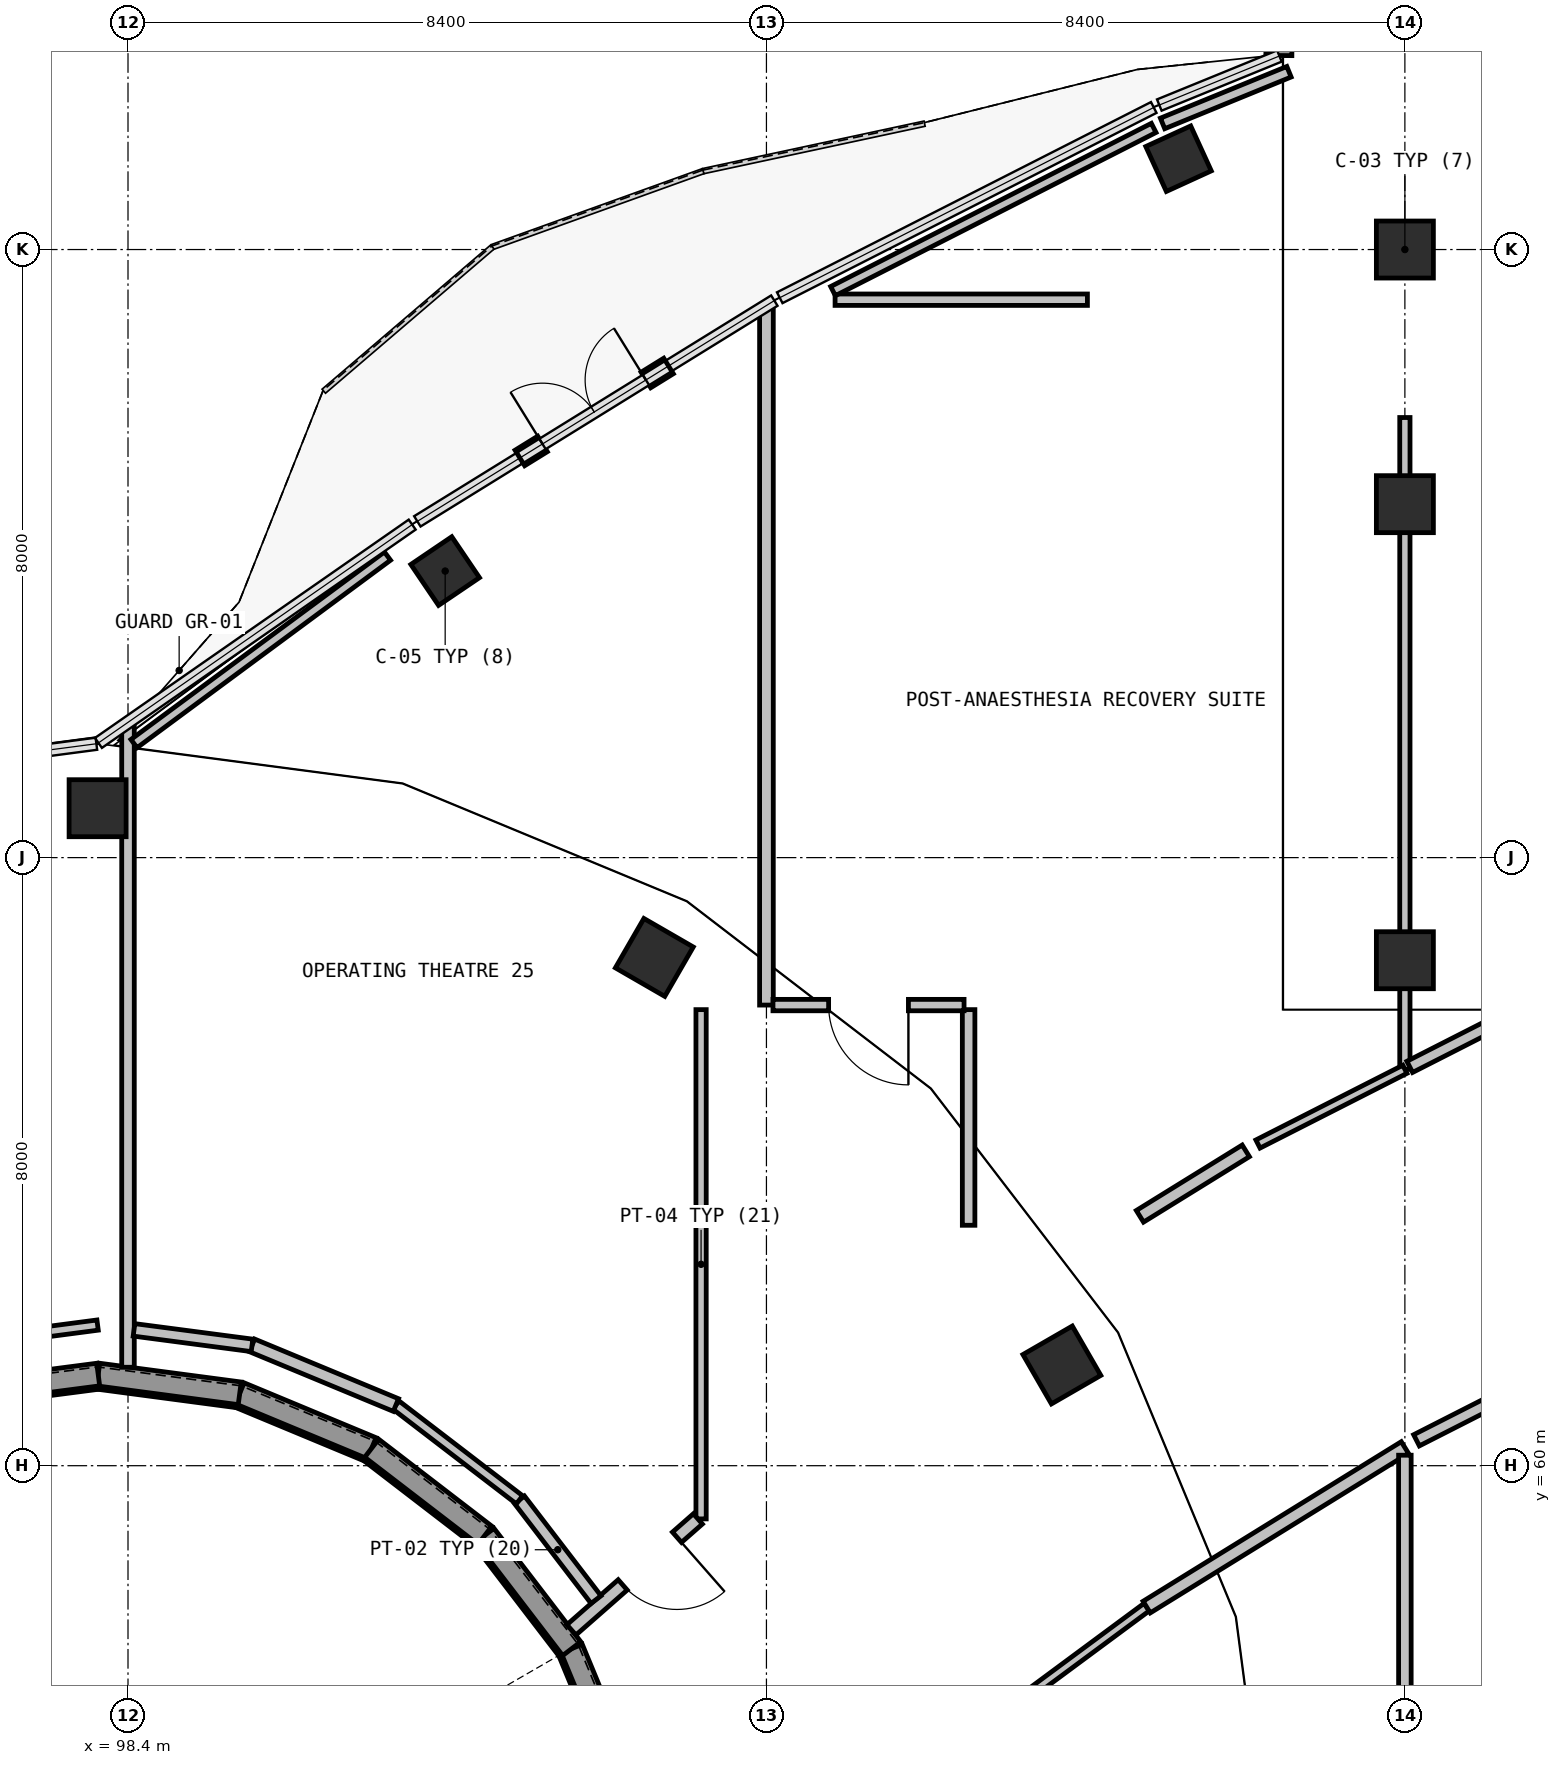
"""IFC4 building model, lengths in metres.
Left out: names, types, materials, properties, quantities, classifications, styles, units other than length and angle.
Written with IfcOpenShell. Run it as: python <this file> out.ifc"""

import sys

from ifc_helpers import new_model, si_unit, direction, frame, frame_2d, origin, origin_2d, place, context, subcontext, project, spatial, rectangle, circle, extrude, element, fill, save


model = new_model("IFC4")
c1 = context("Model", 3, precision=1e-05, world=origin(), true_north=direction((0.0, 1.0)))
c2 = subcontext(c1, "Body", "Model", "MODEL_VIEW")
j1 = project(units=[si_unit("LENGTHUNIT", "METRE"), si_unit("PLANEANGLEUNIT", "RADIAN")], contexts=[c1])
p1 = place(None, origin())
s1 = spatial("IfcSite", under=j1, at=p1, CompositionType="ELEMENT")
p2 = place(p1, origin())
s2 = spatial("IfcBuilding", under=s1, at=p2, CompositionType="ELEMENT")
p3 = place(p2, frame((0.0, 0.0, 10.2)))
s3 = spatial("IfcBuildingStorey", under=s2, at=p3, CompositionType="ELEMENT", Elevation=10.2)
for number, where, z_axis, x_axis in (
    (1, (110.687, 61.325, 0.0), (0.0, 0.0, 1.0), (0.866, 0.5, 0.0)),
    (2, (105.325, 66.687, 0.0), (0.0, 0.0, 1.0), (0.5, 0.866, 0.0)),
    (3, (98.0, 68.65, 0.0), (0.0, 0.0, 1.0), (0.0, 1.0, 0.0)),
):
    element("IfcColumn", number, at=place(p3, frame(where, z_axis=z_axis, x_axis=x_axis)), inside=s3, PredefinedType="COLUMN", context=c2, shape_type="SweptSolid", body=[
        extrude(circle(Radius=0.375, at=origin_2d()), origin(), (0.0, 0.0, 1.0), 4.8),
    ])
for number, where, z_axis, x_axis in (
    (4, (115.2, 66.65, 0.0), (0.0, 0.0, 1.0), (1.0, 0.0, 0.0)),
    (5, (115.2, 72.65, 0.0), (0.0, 0.0, 1.0), (1.0, 0.0, 0.0)),
    (6, (115.2, 76.0, 0.0), (0.0, 0.0, 1.0), (1.0, 0.0, 0.0)),
):
    element("IfcColumn", number, at=place(p3, frame(where, z_axis=z_axis, x_axis=x_axis)), inside=s3, PredefinedType="COLUMN", context=c2, shape_type="SweptSolid", body=[
        extrude(rectangle(XDim=0.75, YDim=0.75, at=origin_2d()), origin(), (0.0, 0.0, 1.0), 4.8),
    ])
for number, where, z_axis, x_axis in (
    (7, (102.573, 71.77, 0.0), (0.0, 0.0, 1.0), (-0.561, 0.828, 0.0)),
    (8, (112.222, 77.195, 0.0), (0.0, 0.0, 1.0), (-0.416, 0.909, 0.0)),
):
    element("IfcColumn", number, at=place(p3, frame(where, z_axis=z_axis, x_axis=x_axis)), inside=s3, PredefinedType="COLUMN", context=c2, shape_type="SweptSolid", body=[
        extrude(rectangle(XDim=0.65, YDim=0.65, at=origin_2d()), origin(), (0.0, 0.0, 1.0), 4.8),
    ])
p4 = place(p3, frame((103.556, 73.258, 0.0), z_axis=(0.0, 0.0, 1.0), x_axis=(0.85044606758, 0.526062245498, 0.0)))
e9 = element("IfcWall", 9, at=p4, inside=s3, PredefinedType="SOLIDWALL", context=c2, shape_type="SweptSolid", body=[
    extrude(rectangle(XDim=2.3, YDim=0.24, at=frame_2d((1.15, 0.0))), origin(), (0.0, 0.0, 1.0), 2.32),
])
p5 = place(p4, frame((0.35, 0.0, 0.0)))
e10 = element("IfcOpeningElement", 10, at=p5, cuts=e9, PredefinedType="OPENING", context=c2, shape_type="SweptSolid", body=[
    extrude(rectangle(XDim=1.6, YDim=2.2, at=frame_2d((0.8, 1.1))), frame((0.0, 0.13, 0.0), z_axis=(0.0, -1.0, 0.0), x_axis=(1.0, 0.0, 0.0)), (0.0, 0.0, 1.0), 0.26),
])
p6 = place(p3, frame((113.563, 78.552, 0.0), z_axis=(0.0, 0.0, 1.0), x_axis=(0.006887325881, 0.99997628209, 0.0)))
e11 = element("IfcWall", 11, at=p6, inside=s3, PredefinedType="SOLIDWALL", context=c2, shape_type="SweptSolid", body=[
    extrude(rectangle(XDim=5.388, YDim=0.3, at=frame_2d((2.694, 0.0))), origin(), (0.0, 0.0, 1.0), 4.46),
])
p7 = place(p6, frame((1.094, 0.0, 0.96)))
e12 = element("IfcOpeningElement", 12, at=p7, cuts=e11, PredefinedType="OPENING", context=c2, shape_type="SweptSolid", body=[
    extrude(rectangle(XDim=3.2, YDim=1.65, at=frame_2d((1.6, 0.825))), frame((0.0, 0.16, 0.0), z_axis=(0.0, -1.0, 0.0), x_axis=(1.0, 0.0, 0.0)), (0.0, 0.0, 1.0), 0.32),
])
p8 = place(p3, frame((101.606, 60.23, 0.0), z_axis=(0.0, 0.0, 1.0), x_axis=(-0.923330302292, 0.384006709406, 0.0)))
e13 = element("IfcWall", 13, at=p8, inside=s3, PredefinedType="SOLIDWALL", context=c2, shape_type="SweptSolid", body=[
    extrude(rectangle(XDim=1.88, YDim=0.3, at=frame_2d((0.94, 0.0))), origin(), (0.0, 0.0, 1.0), 4.46),
])
p9 = place(p3, frame((99.87, 60.952, 0.0), z_axis=(0.0, 0.0, 1.0), x_axis=(-0.991311701137, 0.131533688416, 0.0)))
e14 = element("IfcWall", 14, at=p9, inside=s3, PredefinedType="SOLIDWALL", context=c2, shape_type="SweptSolid", body=[
    extrude(rectangle(XDim=1.878, YDim=0.3, at=frame_2d((0.939, 0.0))), origin(), (0.0, 0.0, 1.0), 4.46),
])
p10 = place(p3, frame((98.008, 61.199, 0.0), z_axis=(0.0, 0.0, 1.0), x_axis=(-0.991606206969, -0.129294741965, 0.0)))
e15 = element("IfcWall", 15, at=p10, inside=s3, PredefinedType="SOLIDWALL", context=c2, shape_type="SweptSolid", body=[
    extrude(rectangle(XDim=1.879, YDim=0.3, at=frame_2d((0.939, 0.0))), origin(), (0.0, 0.0, 1.0), 4.46),
])
p11 = place(p3, frame((104.956, 55.855, 0.0), z_axis=(0.0, 0.0, 1.0), x_axis=(-0.381820428435, 0.924236528401, 0.0)))
e16 = element("IfcWall", 16, at=p11, inside=s3, PredefinedType="SOLIDWALL", context=c2, shape_type="SweptSolid", body=[
    extrude(rectangle(XDim=1.881, YDim=0.3, at=frame_2d((0.94, 0.0))), origin(), (0.0, 0.0, 1.0), 4.46),
])
p12 = place(p3, frame((104.238, 57.593, 0.0), z_axis=(0.0, 0.0, 1.0), x_axis=(-0.607850341861, 0.79405161161, 0.0)))
e17 = element("IfcWall", 17, at=p12, inside=s3, PredefinedType="SOLIDWALL", context=c2, shape_type="SweptSolid", body=[
    extrude(rectangle(XDim=1.879, YDim=0.3, at=frame_2d((0.939, 0.0))), origin(), (0.0, 0.0, 1.0), 4.46),
])
p13 = place(p3, frame((103.096, 59.085, 0.0), z_axis=(0.0, 0.0, 1.0), x_axis=(-0.792913688324, 0.609333966613, 0.0)))
e18 = element("IfcWall", 18, at=p13, inside=s3, PredefinedType="SOLIDWALL", context=c2, shape_type="SweptSolid", body=[
    extrude(rectangle(XDim=1.879, YDim=0.3, at=frame_2d((0.939, 0.0))), origin(), (0.0, 0.0, 1.0), 4.46),
])
p14 = place(p3, frame((98.0, 61.85, 0.0), z_axis=(0.0, 0.0, 1.0), x_axis=(-0.991471721493, -0.130322006886, 0.0)))
e19 = element("IfcWall", 19, at=p14, inside=s3, PredefinedType="PARTITIONING", context=c2, shape_type="SweptSolid", body=[
    extrude(rectangle(XDim=2.05, YDim=0.135, at=frame_2d((1.025, 0.0))), origin(), (0.0, 0.0, 1.0), 4.46),
])
p15 = place(p3, frame((98.4, 69.766, 0.0), z_axis=(0.0, 0.0, 1.0), x_axis=(0.0, -1.0, 0.0)))
e20 = element("IfcWall", 20, at=p15, inside=s3, PredefinedType="PARTITIONING", context=c2, shape_type="SweptSolid", body=[
    extrude(rectangle(XDim=8.471, YDim=0.165, at=frame_2d((4.236, 0.0))), origin(), (0.0, 0.0, 1.0), 4.46),
])
p16 = place(p3, frame((105.94, 66.0, 0.0), z_axis=(0.0, 0.0, 1.0), x_axis=(0.0, -1.0, 0.0)))
e21 = element("IfcWall", 21, at=p16, inside=s3, PredefinedType="PARTITIONING", context=c2, shape_type="SweptSolid", body=[
    extrude(rectangle(XDim=6.7, YDim=0.135, at=frame_2d((3.35, 0.0))), origin(), (0.0, 0.0, 1.0), 4.46),
])
p17 = place(p3, frame((105.898, 59.3, 0.0), z_axis=(0.0, 0.0, 1.0), x_axis=(-0.751701560076, -0.65950342272, 0.0)))
e22 = element("IfcWall", 22, at=p17, inside=s3, PredefinedType="PARTITIONING", context=c2, shape_type="SweptSolid", body=[
    extrude(rectangle(XDim=2.214, YDim=0.18, at=frame_2d((1.107, 0.0))), origin(), (0.0, 0.0, 1.0), 4.46),
])
p18 = place(p17, frame((0.366, 0.0, 0.0)))
e23 = element("IfcOpeningElement", 23, at=p18, cuts=e22, PredefinedType="OPENING", context=c2, shape_type="SweptSolid", body=[
    extrude(rectangle(XDim=0.95, YDim=2.1, at=frame_2d((0.475, 1.05))), frame((0.0, 0.1, 0.0), z_axis=(0.0, -1.0, 0.0), x_axis=(1.0, 0.0, 0.0)), (0.0, 0.0, 1.0), 0.2),
])
p19 = place(p3, frame((104.558, 58.238, 0.0), z_axis=(0.0, 0.0, 1.0), x_axis=(-0.608604984836, 0.793473359624, 0.0)))
e24 = element("IfcWall", 24, at=p19, inside=s3, PredefinedType="PARTITIONING", context=c2, shape_type="SweptSolid", body=[
    extrude(rectangle(XDim=1.655, YDim=0.165, at=frame_2d((0.827, 0.0))), origin(), (0.0, 0.0, 1.0), 4.46),
])
p20 = place(p3, frame((103.551, 59.551, 0.0), z_axis=(0.0, 0.0, 1.0), x_axis=(-0.793491289639, 0.608581607729, 0.0)))
e25 = element("IfcWall", 25, at=p20, inside=s3, PredefinedType="PARTITIONING", context=c2, shape_type="SweptSolid", body=[
    extrude(rectangle(XDim=2.049, YDim=0.135, at=frame_2d((1.024, 0.0))), origin(), (0.0, 0.0, 1.0), 4.46),
])
p21 = place(p3, frame((101.925, 60.798, 0.0), z_axis=(0.0, 0.0, 1.0), x_axis=(-0.923745197655, 0.383007584532, 0.0)))
e26 = element("IfcWall", 26, at=p21, inside=s3, PredefinedType="PARTITIONING", context=c2, shape_type="SweptSolid", body=[
    extrude(rectangle(XDim=2.049, YDim=0.18, at=frame_2d((1.025, 0.0))), origin(), (0.0, 0.0, 1.0), 4.46),
])
p22 = place(p3, frame((100.032, 61.583, 0.0), z_axis=(0.0, 0.0, 1.0), x_axis=(-0.991473913665, 0.130305328065, 0.0)))
e27 = element("IfcWall", 27, at=p22, inside=s3, PredefinedType="PARTITIONING", context=c2, shape_type="SweptSolid", body=[
    extrude(rectangle(XDim=1.566, YDim=0.165, at=frame_2d((0.783, 0.0))), origin(), (0.0, 0.0, 1.0), 4.46),
])
p23 = place(p3, frame((98.479, 69.5, 0.0), z_axis=(0.0, 0.0, 1.0), x_axis=(0.803937569327, 0.594713699711, 0.0)))
e28 = element("IfcWall", 28, at=p23, inside=s3, PredefinedType="PARTITIONING", context=c2, shape_type="SweptSolid", body=[
    extrude(rectangle(XDim=4.148, YDim=0.135, at=frame_2d((2.074, 0.0))), origin(), (0.0, 0.0, 1.0), 4.46),
])
p24 = place(p3, frame((106.8, 75.251, 0.0), z_axis=(0.0, 0.0, 1.0), x_axis=(0.0, -1.0, 0.0)))
e29 = element("IfcWall", 29, at=p24, inside=s3, PredefinedType="PARTITIONING", context=c2, shape_type="SweptSolid", body=[
    extrude(rectangle(XDim=9.191, YDim=0.18, at=frame_2d((4.595, 0.0))), origin(), (0.0, 0.0, 1.0), 4.46),
])
p25 = place(p3, frame((109.46, 56.406, 0.0), z_axis=(0.0, 0.0, 1.0), x_axis=(0.803833088097, 0.594854912125, 0.0)))
e30 = element("IfcWall", 30, at=p25, inside=s3, PredefinedType="PARTITIONING", context=c2, shape_type="SweptSolid", body=[
    extrude(rectangle(XDim=2.915, YDim=0.12, at=frame_2d((1.458, 0.0))), origin(), (0.0, 0.0, 1.0), 4.46),
])
p26 = place(p3, frame((111.803, 58.14, 0.0), z_axis=(0.0, 0.0, 1.0), x_axis=(0.850687032492, 0.525672495714, 0.0)))
e31 = element("IfcWall", 31, at=p26, inside=s3, PredefinedType="PARTITIONING", context=c2, shape_type="SweptSolid", body=[
    extrude(rectangle(XDim=3.993, YDim=0.18, at=frame_2d((1.997, 0.0))), origin(), (0.0, 0.0, 1.0), 4.46),
])
p27 = place(p3, frame((115.2, 60.138, 0.0), z_axis=(0.0, 0.0, 1.0), x_axis=(0.0, -1.0, 0.0)))
e32 = element("IfcWall", 32, at=p27, inside=s3, PredefinedType="PARTITIONING", context=c2, shape_type="SweptSolid", body=[
    extrude(rectangle(XDim=15.538, YDim=0.165, at=frame_2d((7.769, 0.0))), origin(), (0.0, 0.0, 1.0), 4.46),
])
p28 = place(p3, frame((107.703, 75.34, 0.0), z_axis=(0.0, 0.0, 1.0), x_axis=(1.0, 0.0, 0.0)))
e33 = element("IfcWall", 33, at=p28, inside=s3, PredefinedType="PARTITIONING", context=c2, shape_type="SweptSolid", body=[
    extrude(rectangle(XDim=3.32, YDim=0.15, at=frame_2d((1.66, 0.0))), origin(), (0.0, 0.0, 1.0), 4.46),
])
p29 = place(p3, frame((115.2, 73.79, 0.0), z_axis=(0.0, 0.0, 1.0), x_axis=(0.0, -1.0, 0.0)))
e34 = element("IfcWall", 34, at=p29, inside=s3, PredefinedType="PARTITIONING", context=c2, shape_type="SweptSolid", body=[
    extrude(rectangle(XDim=8.575, YDim=0.135, at=frame_2d((4.288, 0.0))), origin(), (0.0, 0.0, 1.0), 3.76),
])
p30 = place(p3, frame((115.2, 65.215, 0.0), z_axis=(0.0, 0.0, 1.0), x_axis=(-0.891321133159, -0.45337251525, 0.0)))
e35 = element("IfcWall", 35, at=p30, inside=s3, PredefinedType="PARTITIONING", context=c2, shape_type="SweptSolid", body=[
    extrude(rectangle(XDim=2.168, YDim=0.12, at=frame_2d((1.084, 0.0))), origin(), (0.0, 0.0, 1.0), 4.46),
])
p31 = place(p3, frame((113.107, 64.142, 0.0), z_axis=(0.0, 0.0, 1.0), x_axis=(-0.850576382598, -0.525851516463, 0.0)))
e36 = element("IfcWall", 36, at=p31, inside=s3, PredefinedType="PARTITIONING", context=c2, shape_type="SweptSolid", body=[
    extrude(rectangle(XDim=1.637, YDim=0.18, at=frame_2d((0.819, 0.0))), origin(), (0.0, 0.0, 1.0), 4.46),
])
p32 = place(p3, frame((109.46, 63.163, 0.0), z_axis=(0.0, 0.0, 1.0), x_axis=(0.0, 1.0, 0.0)))
e37 = element("IfcWall", 37, at=p32, inside=s3, PredefinedType="PARTITIONING", context=c2, shape_type="SweptSolid", body=[
    extrude(rectangle(XDim=2.837, YDim=0.165, at=frame_2d((1.418, 0.0))), origin(), (0.0, 0.0, 1.0), 4.46),
])
p33 = place(p3, frame((109.4, 66.06, 0.0), z_axis=(0.0, 0.0, 1.0), x_axis=(-1.0, 0.0, 0.0)))
e38 = element("IfcWall", 38, at=p33, inside=s3, PredefinedType="PARTITIONING", context=c2, shape_type="SweptSolid", body=[
    extrude(rectangle(XDim=2.514, YDim=0.15, at=frame_2d((1.257, 0.0))), origin(), (0.0, 0.0, 1.0), 4.46),
])
p34 = place(p33, frame((0.732, 0.0, 0.0)))
e39 = element("IfcOpeningElement", 39, at=p34, cuts=e38, PredefinedType="OPENING", context=c2, shape_type="SweptSolid", body=[
    extrude(rectangle(XDim=1.05, YDim=2.15, at=frame_2d((0.525, 1.075))), frame((0.0, 0.085, 0.0), z_axis=(0.0, -1.0, 0.0), x_axis=(1.0, 0.0, 0.0)), (0.0, 0.0, 1.0), 0.17),
])
p35 = place(p3, frame((111.895, 77.6, 0.0), z_axis=(0.0, 0.0, 1.0), x_axis=(-0.891217321541, -0.453576548982, 0.0)))
e40 = element("IfcWall", 40, at=p35, inside=s3, PredefinedType="PARTITIONING", context=c2, shape_type="SweptSolid", body=[
    extrude(rectangle(XDim=4.734, YDim=0.135, at=frame_2d((2.367, 0.0))), origin(), (0.0, 0.0, 1.0), 4.46),
])
p36 = place(p3, frame((115.353, 60.334, 0.0), z_axis=(0.0, 0.0, 1.0), x_axis=(0.891282591813, 0.453448278782, 0.0)))
e41 = element("IfcWall", 41, at=p36, inside=s3, PredefinedType="PARTITIONING", context=c2, shape_type="SweptSolid", body=[
    extrude(rectangle(XDim=4.175, YDim=0.165, at=frame_2d((2.087, 0.0))), origin(), (0.0, 0.0, 1.0), 4.46),
])
p37 = place(p36, frame((1.262, 0.0, 0.0)))
e42 = element("IfcOpeningElement", 42, at=p37, cuts=e41, PredefinedType="OPENING", context=c2, shape_type="SweptSolid", body=[
    extrude(rectangle(XDim=1.65, YDim=2.2, at=frame_2d((0.825, 1.1))), frame((0.0, 0.093, 0.0), z_axis=(0.0, -1.0, 0.0), x_axis=(1.0, 0.0, 0.0)), (0.0, 0.0, 1.0), 0.185),
])
p38 = place(p3, frame((117.151, 66.208, 0.0), z_axis=(0.0, 0.0, 1.0), x_axis=(-0.891105476665, -0.453796242225, 0.0)))
e43 = element("IfcWall", 43, at=p38, inside=s3, PredefinedType="PARTITIONING", context=c2, shape_type="SweptSolid", body=[
    extrude(rectangle(XDim=2.117, YDim=0.165, at=frame_2d((1.059, 0.0))), origin(), (0.0, 0.0, 1.0), 4.46),
])
p39 = place(p3, frame((113.675, 78.339, 0.0), z_axis=(0.0, 0.0, 1.0), x_axis=(-0.925581582464, -0.37854819271, 0.0)))
e44 = element("IfcWall", 44, at=p39, inside=s3, PredefinedType="PARTITIONING", context=c2, shape_type="SweptSolid", body=[
    extrude(rectangle(XDim=1.797, YDim=0.15, at=frame_2d((0.898, 0.0))), origin(), (0.0, 0.0, 1.0), 4.46),
])
p40 = place(p5, origin())
e45 = element("IfcDoor", 45, at=p40, inside=s3, OperationType="DOUBLE_DOOR_SINGLE_SWING", PredefinedType="DOOR", context=c2, shape_type="SweptSolid", body=[
    extrude(rectangle(XDim=1.6, YDim=2.2, at=frame_2d((0.8, 1.1))), frame((0.0, 0.025, 0.0), z_axis=(0.0, -1.0, 0.0), x_axis=(1.0, 0.0, 0.0)), (0.0, 0.0, 1.0), 0.05),
])
fill(e10, e45)
p41 = place(p18, origin())
e46 = element("IfcDoor", 46, at=p41, inside=s3, OperationType="SINGLE_SWING_LEFT", PredefinedType="DOOR", context=c2, shape_type="SweptSolid", body=[
    extrude(rectangle(XDim=0.95, YDim=2.1, at=frame_2d((0.475, 1.05))), frame((0.0, 0.025, 0.0), z_axis=(0.0, -1.0, 0.0), x_axis=(1.0, 0.0, 0.0)), (0.0, 0.0, 1.0), 0.05),
])
fill(e23, e46)
p42 = place(p34, origin())
e47 = element("IfcDoor", 47, at=p42, inside=s3, OperationType="SINGLE_SWING_LEFT", PredefinedType="DOOR", context=c2, shape_type="SweptSolid", body=[
    extrude(rectangle(XDim=1.05, YDim=2.15, at=frame_2d((0.525, 1.075))), frame((0.0, 0.025, 0.0), z_axis=(0.0, -1.0, 0.0), x_axis=(1.0, 0.0, 0.0)), (0.0, 0.0, 1.0), 0.05),
])
fill(e39, e47)
save(model, sys.argv[1])
